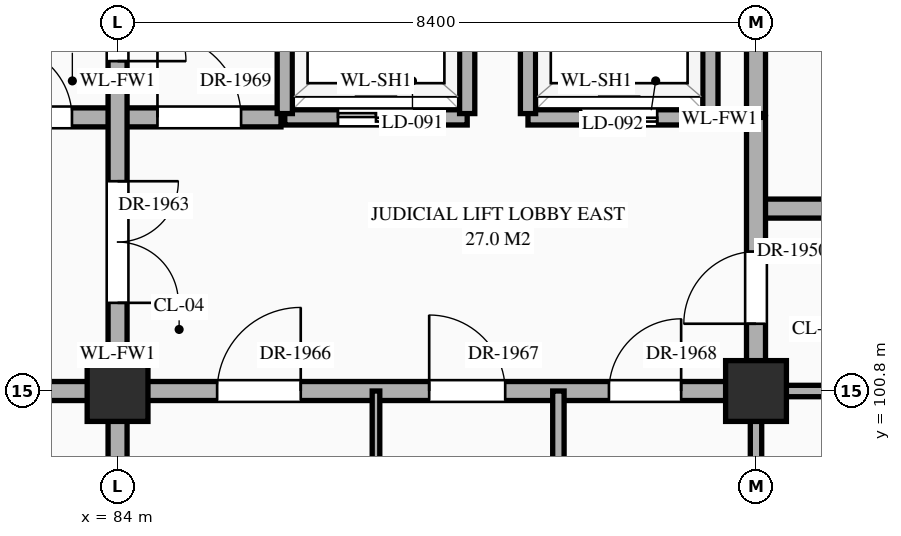
"""IFC4 building model, lengths in metres.
Left out: names, types, materials, properties, quantities, classifications, styles, units other than length and angle.
Written with IfcOpenShell. Run it as: python <this file> out.ifc"""

import sys

from ifc_helpers import new_model, si_unit, direction, frame, frame_2d, origin, origin_2d, place, context, subcontext, project, spatial, rectangle, extrude, element, fill, save


model = new_model("IFC4")
c1 = context("Model", 3, precision=1e-05, world=origin(), true_north=direction((0.0, 1.0)))
c2 = subcontext(c1, "Body", "Model", "MODEL_VIEW")
j1 = project(units=[si_unit("LENGTHUNIT", "METRE"), si_unit("PLANEANGLEUNIT", "RADIAN")], contexts=[c1])
p1 = place(None, origin())
s1 = spatial("IfcSite", under=j1, at=p1, CompositionType="ELEMENT")
p2 = place(p1, origin())
s2 = spatial("IfcBuilding", under=s1, at=p2, CompositionType="ELEMENT")
p3 = place(p2, frame((0.0, 0.0, 21.6)))
s3 = spatial("IfcBuildingStorey", under=s2, at=p3, CompositionType="ELEMENT", Elevation=21.6)
for number, where, z_axis, x_axis in (
    (1, (84.0, 100.8, 0.0), (0.0, 0.0, 1.0), (1.0, 0.0, 0.0)),
    (2, (92.4, 100.8, 0.0), (0.0, 0.0, 1.0), (1.0, 0.0, 0.0)),
):
    element("IfcColumn", number, at=place(p3, frame(where, z_axis=z_axis, x_axis=x_axis)), inside=s3, PredefinedType="COLUMN", context=c2, shape_type="SweptSolid", body=[
        extrude(rectangle(XDim=0.8, YDim=0.8, at=origin_2d()), origin(), (0.0, 0.0, 1.0), 4.5),
    ])
p4 = place(p3, frame((75.6, 100.8, 0.0), z_axis=(0.0, 0.0, 1.0), x_axis=(1.0, 0.0, 0.0)))
e3 = element("IfcWall", 3, at=p4, inside=s3, PredefinedType="STANDARD", context=c2, shape_type="SweptSolid", body=[
    extrude(rectangle(XDim=16.8, YDim=0.25, at=frame_2d((8.4, 0.0))), origin(), (0.0, 0.0, 1.0), 3.39),
])
p5 = place(p4, frame((3.7, 0.0, 0.0)))
e4 = element("IfcOpeningElement", 4, at=p5, cuts=e3, PredefinedType="OPENING", context=c2, shape_type="SweptSolid", body=[
    extrude(rectangle(XDim=1.0, YDim=2.2, at=frame_2d((0.5, 1.1))), frame((0.0, 0.137, 0.0), z_axis=(0.0, -1.0, 0.0), x_axis=(1.0, 0.0, 0.0)), (0.0, 0.0, 1.0), 0.274),
])
p6 = place(p4, frame((9.71, 0.0, 0.0)))
e5 = element("IfcOpeningElement", 5, at=p6, cuts=e3, PredefinedType="OPENING", context=c2, shape_type="SweptSolid", body=[
    extrude(rectangle(XDim=1.1, YDim=2.2, at=frame_2d((0.55, 1.1))), frame((0.0, 0.137, 0.0), z_axis=(0.0, -1.0, 0.0), x_axis=(1.0, 0.0, 0.0)), (0.0, 0.0, 1.0), 0.274),
])
p7 = place(p4, frame((12.5, 0.0, 0.0)))
e6 = element("IfcOpeningElement", 6, at=p7, cuts=e3, PredefinedType="OPENING", context=c2, shape_type="SweptSolid", body=[
    extrude(rectangle(XDim=1.0, YDim=2.2, at=frame_2d((0.5, 1.1))), frame((0.0, 0.137, 0.0), z_axis=(0.0, -1.0, 0.0), x_axis=(1.0, 0.0, 0.0)), (0.0, 0.0, 1.0), 0.274),
])
p8 = place(p4, frame((14.865, 0.0, 0.0)))
e7 = element("IfcOpeningElement", 7, at=p8, cuts=e3, PredefinedType="OPENING", context=c2, shape_type="SweptSolid", body=[
    extrude(rectangle(XDim=0.95, YDim=2.15, at=frame_2d((0.475, 1.075))), frame((0.0, 0.137, 0.0), z_axis=(0.0, -1.0, 0.0), x_axis=(1.0, 0.0, 0.0)), (0.0, 0.0, 1.0), 0.274),
])
p9 = place(p3, frame((92.4, 100.8, 0.0), z_axis=(0.0, 0.0, 1.0), x_axis=(1.0, 0.0, 0.0)))
e8 = element("IfcWall", 8, at=p9, inside=s3, PredefinedType="STANDARD", context=c2, shape_type="SweptSolid", body=[
    extrude(rectangle(XDim=4.2, YDim=0.15, at=frame_2d((2.1, 0.0))), origin(), (0.0, 0.0, 1.0), 3.39),
])
p10 = place(p9, frame((1.83, 0.0, 0.0)))
e9 = element("IfcOpeningElement", 9, at=p10, cuts=e8, PredefinedType="OPENING", context=c2, shape_type="SweptSolid", body=[
    extrude(rectangle(XDim=0.86, YDim=2.1, at=frame_2d((0.43, 1.05))), frame((0.0, 0.087, 0.0), z_axis=(0.0, -1.0, 0.0), x_axis=(1.0, 0.0, 0.0)), (0.0, 0.0, 1.0), 0.174),
])
p11 = place(p3, frame((92.4, 103.2, 0.0), z_axis=(0.0, 0.0, 1.0), x_axis=(1.0, 0.0, 0.0)))
e10 = element("IfcWall", 10, at=p11, inside=s3, PredefinedType="STANDARD", context=c2, shape_type="SweptSolid", body=[
    extrude(rectangle(XDim=4.2, YDim=0.25, at=frame_2d((2.1, 0.0))), origin(), (0.0, 0.0, 1.0), 4.24),
])
p12 = place(p11, frame((1.55, 0.0, 0.0)))
e11 = element("IfcOpeningElement", 11, at=p12, cuts=e10, PredefinedType="OPENING", context=c2, shape_type="SweptSolid", body=[
    extrude(rectangle(XDim=1.1, YDim=2.2, at=frame_2d((0.55, 1.1))), frame((0.0, 0.137, 0.0), z_axis=(0.0, -1.0, 0.0), x_axis=(1.0, 0.0, 0.0)), (0.0, 0.0, 1.0), 0.274),
])
p13 = place(p3, frame((81.85, 104.4, 0.0), z_axis=(0.0, 0.0, 1.0), x_axis=(1.0, 0.0, 0.0)))
e12 = element("IfcWall", 12, at=p13, inside=s3, PredefinedType="STANDARD", context=c2, shape_type="SweptSolid", body=[
    extrude(rectangle(XDim=4.3, YDim=0.25, at=frame_2d((2.15, 0.0))), origin(), (0.0, 0.0, 1.0), 4.24),
])
p14 = place(p13, frame((0.6, 0.0, 0.0)))
e13 = element("IfcOpeningElement", 13, at=p14, cuts=e12, PredefinedType="OPENING", context=c2, shape_type="SweptSolid", body=[
    extrude(rectangle(XDim=0.95, YDim=2.15, at=frame_2d((0.475, 1.075))), frame((0.0, 0.137, 0.0), z_axis=(0.0, -1.0, 0.0), x_axis=(1.0, 0.0, 0.0)), (0.0, 0.0, 1.0), 0.274),
])
p15 = place(p13, frame((2.675, 0.0, 0.0)))
e14 = element("IfcOpeningElement", 14, at=p15, cuts=e12, PredefinedType="OPENING", context=c2, shape_type="SweptSolid", body=[
    extrude(rectangle(XDim=1.1, YDim=2.2, at=frame_2d((0.55, 1.1))), frame((0.0, 0.137, 0.0), z_axis=(0.0, -1.0, 0.0), x_axis=(1.0, 0.0, 0.0)), (0.0, 0.0, 1.0), 0.274),
])
p16 = place(p3, frame((86.2, 104.4, 0.0), z_axis=(0.0, 0.0, 1.0), x_axis=(1.0, 0.0, 0.0)))
e15 = element("IfcWall", 15, at=p16, inside=s3, PredefinedType="STANDARD", context=c2, shape_type="SweptSolid", body=[
    extrude(rectangle(XDim=2.4, YDim=0.2, at=frame_2d((1.2, 0.0))), origin(), (0.0, 0.0, 1.0), 4.24),
])
p17 = place(p16, frame((0.7, 0.0, 0.0)))
e16 = element("IfcOpeningElement", 16, at=p17, cuts=e15, PredefinedType="OPENING", context=c2, shape_type="SweptSolid", body=[
    extrude(rectangle(XDim=1.0, YDim=2.15, at=frame_2d((0.5, 1.075))), frame((0.0, 0.112, 0.0), z_axis=(0.0, -1.0, 0.0), x_axis=(1.0, 0.0, 0.0)), (0.0, 0.0, 1.0), 0.224),
])
p18 = place(p3, frame((89.4, 104.4, 0.0), z_axis=(0.0, 0.0, 1.0), x_axis=(1.0, 0.0, 0.0)))
e17 = element("IfcWall", 17, at=p18, inside=s3, PredefinedType="STANDARD", context=c2, shape_type="SweptSolid", body=[
    extrude(rectangle(XDim=2.4, YDim=0.2, at=frame_2d((1.2, 0.0))), origin(), (0.0, 0.0, 1.0), 4.24),
])
p19 = place(p18, frame((0.7, 0.0, 0.0)))
e18 = element("IfcOpeningElement", 18, at=p19, cuts=e17, PredefinedType="OPENING", context=c2, shape_type="SweptSolid", body=[
    extrude(rectangle(XDim=1.0, YDim=2.15, at=frame_2d((0.5, 1.075))), frame((0.0, 0.112, 0.0), z_axis=(0.0, -1.0, 0.0), x_axis=(1.0, 0.0, 0.0)), (0.0, 0.0, 1.0), 0.224),
])
p20 = place(p3, frame((84.0, 79.24, 0.0), z_axis=(0.0, 0.0, 1.0), x_axis=(0.0, 1.0, 0.0)))
e19 = element("IfcWall", 19, at=p20, inside=s3, PredefinedType="STANDARD", context=c2, shape_type="SweptSolid", body=[
    extrude(rectangle(XDim=35.92, YDim=0.25, at=frame_2d((17.96, 0.0))), origin(), (0.0, 0.0, 1.0), 3.49),
])
p21 = place(p20, frame((22.72, 0.0, 0.0)))
e20 = element("IfcOpeningElement", 20, at=p21, cuts=e19, PredefinedType="OPENING", context=c2, shape_type="SweptSolid", body=[
    extrude(rectangle(XDim=1.6, YDim=2.3, at=frame_2d((0.8, 1.15))), frame((0.0, 0.137, 0.0), z_axis=(0.0, -1.0, 0.0), x_axis=(1.0, 0.0, 0.0)), (0.0, 0.0, 1.0), 0.274),
])
p22 = place(p20, frame((12.45, 0.0, 0.0)))
e21 = element("IfcOpeningElement", 21, at=p22, cuts=e19, PredefinedType="OPENING", context=c2, shape_type="SweptSolid", body=[
    extrude(rectangle(XDim=1.1, YDim=2.2, at=frame_2d((0.55, 1.1))), frame((0.0, 0.137, 0.0), z_axis=(0.0, -1.0, 0.0), x_axis=(1.0, 0.0, 0.0)), (0.0, 0.0, 1.0), 0.274),
])
p23 = place(p20, frame((15.245, 0.0, 0.0)))
e22 = element("IfcOpeningElement", 22, at=p23, cuts=e19, PredefinedType="OPENING", context=c2, shape_type="SweptSolid", body=[
    extrude(rectangle(XDim=0.95, YDim=2.15, at=frame_2d((0.475, 1.075))), frame((0.0, 0.137, 0.0), z_axis=(0.0, -1.0, 0.0), x_axis=(1.0, 0.0, 0.0)), (0.0, 0.0, 1.0), 0.274),
])
p24 = place(p20, frame((25.9, 0.0, 0.0)))
e23 = element("IfcOpeningElement", 23, at=p24, cuts=e19, PredefinedType="OPENING", context=c2, shape_type="SweptSolid", body=[
    extrude(rectangle(XDim=1.8, YDim=2.35, at=frame_2d((0.9, 1.175))), frame((0.0, 0.137, 0.0), z_axis=(0.0, -1.0, 0.0), x_axis=(1.0, 0.0, 0.0)), (0.0, 0.0, 1.0), 0.274),
])
p25 = place(p20, frame((29.62, 0.0, 0.0)))
e24 = element("IfcOpeningElement", 24, at=p25, cuts=e19, PredefinedType="OPENING", context=c2, shape_type="SweptSolid", body=[
    extrude(rectangle(XDim=1.0, YDim=2.2, at=frame_2d((0.5, 1.1))), frame((0.0, 0.137, 0.0), z_axis=(0.0, -1.0, 0.0), x_axis=(1.0, 0.0, 0.0)), (0.0, 0.0, 1.0), 0.274),
])
p26 = place(p20, frame((5.3, 0.0, 0.0)))
e25 = element("IfcOpeningElement", 25, at=p26, cuts=e19, PredefinedType="OPENING", context=c2, shape_type="SweptSolid", body=[
    extrude(rectangle(XDim=1.0, YDim=2.2, at=frame_2d((0.5, 1.1))), frame((0.0, 0.137, 0.0), z_axis=(0.0, -1.0, 0.0), x_axis=(1.0, 0.0, 0.0)), (0.0, 0.0, 1.0), 0.274),
])
p27 = place(p3, frame((86.2, 104.45, 0.0), z_axis=(0.0, 0.0, 1.0), x_axis=(0.0, 1.0, 0.0)))
e26 = element("IfcWall", 26, at=p27, inside=s3, PredefinedType="STANDARD", context=c2, shape_type="SweptSolid", body=[
    extrude(rectangle(XDim=2.3, YDim=0.2, at=frame_2d((1.15, 0.0))), origin(), (0.0, 0.0, 1.0), 4.24),
])
p28 = place(p3, frame((87.4, 96.0, 0.0), z_axis=(0.0, 0.0, 1.0), x_axis=(0.0, 1.0, 0.0)))
e27 = element("IfcWall", 27, at=p28, inside=s3, PredefinedType="STANDARD", context=c2, shape_type="SweptSolid", body=[
    extrude(rectangle(XDim=4.8, YDim=0.1, at=frame_2d((2.4, 0.0))), origin(), (0.0, 0.0, 1.0), 4.24),
])
p29 = place(p28, frame((1.83, 0.0, 0.0)))
e28 = element("IfcOpeningElement", 28, at=p29, cuts=e27, PredefinedType="OPENING", context=c2, shape_type="SweptSolid", body=[
    extrude(rectangle(XDim=1.14, YDim=2.4, at=frame_2d((0.57, 1.2))), frame((0.0, 0.062, 0.0), z_axis=(0.0, -1.0, 0.0), x_axis=(1.0, 0.0, 0.0)), (0.0, 0.0, 1.0), 0.124),
])
for number, where, z_axis, x_axis in (
    (29, (88.6, 104.45, 0.0), (0.0, 0.0, 1.0), (0.0, 1.0, 0.0)),
    (30, (89.4, 104.45, 0.0), (0.0, 0.0, 1.0), (0.0, 1.0, 0.0)),
):
    element("IfcWall", number, at=place(p3, frame(where, z_axis=z_axis, x_axis=x_axis)), inside=s3, PredefinedType="STANDARD", context=c2, shape_type="SweptSolid", body=[
        extrude(rectangle(XDim=2.3, YDim=0.2, at=frame_2d((1.15, 0.0))), origin(), (0.0, 0.0, 1.0), 4.24),
    ])
p30 = place(p3, frame((89.8, 96.0, 0.0), z_axis=(0.0, 0.0, 1.0), x_axis=(0.0, 1.0, 0.0)))
e31 = element("IfcWall", 31, at=p30, inside=s3, PredefinedType="STANDARD", context=c2, shape_type="SweptSolid", body=[
    extrude(rectangle(XDim=4.8, YDim=0.15, at=frame_2d((2.4, 0.0))), origin(), (0.0, 0.0, 1.0), 4.24),
])
p31 = place(p30, frame((1.95, 0.0, 0.0)))
e32 = element("IfcOpeningElement", 32, at=p31, cuts=e31, PredefinedType="OPENING", context=c2, shape_type="SweptSolid", body=[
    extrude(rectangle(XDim=0.9, YDim=2.15, at=frame_2d((0.45, 1.075))), frame((0.0, 0.087, 0.0), z_axis=(0.0, -1.0, 0.0), x_axis=(1.0, 0.0, 0.0)), (0.0, 0.0, 1.0), 0.174),
])
p32 = place(p3, frame((91.8, 104.45, 0.0), z_axis=(0.0, 0.0, 1.0), x_axis=(0.0, 1.0, 0.0)))
e33 = element("IfcWall", 33, at=p32, inside=s3, PredefinedType="STANDARD", context=c2, shape_type="SweptSolid", body=[
    extrude(rectangle(XDim=2.3, YDim=0.2, at=frame_2d((1.15, 0.0))), origin(), (0.0, 0.0, 1.0), 4.24),
])
p33 = place(p3, frame((92.4, 96.0, 0.0), z_axis=(0.0, 0.0, 1.0), x_axis=(0.0, 1.0, 0.0)))
e34 = element("IfcWall", 34, at=p33, inside=s3, PredefinedType="STANDARD", context=c2, shape_type="SweptSolid", body=[
    extrude(rectangle(XDim=4.8, YDim=0.15, at=frame_2d((2.4, 0.0))), origin(), (0.0, 0.0, 1.0), 3.49),
])
p34 = place(p3, frame((92.4, 100.8, 0.0), z_axis=(0.0, 0.0, 1.0), x_axis=(0.0, 1.0, 0.0)))
e35 = element("IfcWall", 35, at=p34, inside=s3, PredefinedType="STANDARD", context=c2, shape_type="SweptSolid", body=[
    extrude(rectangle(XDim=3.6, YDim=0.25, at=frame_2d((1.8, 0.0))), origin(), (0.0, 0.0, 1.0), 3.49),
])
p35 = place(p34, frame((0.885, 0.0, 0.0)))
e36 = element("IfcOpeningElement", 36, at=p35, cuts=e35, PredefinedType="OPENING", context=c2, shape_type="SweptSolid", body=[
    extrude(rectangle(XDim=0.95, YDim=2.15, at=frame_2d((0.475, 1.075))), frame((0.0, 0.137, 0.0), z_axis=(0.0, -1.0, 0.0), x_axis=(1.0, 0.0, 0.0)), (0.0, 0.0, 1.0), 0.274),
])
p36 = place(p3, frame((92.4, 104.45, 0.0), z_axis=(0.0, 0.0, 1.0), x_axis=(0.0, 1.0, 0.0)))
e37 = element("IfcWall", 37, at=p36, inside=s3, PredefinedType="STANDARD", context=c2, shape_type="SweptSolid", body=[
    extrude(rectangle(XDim=3.5, YDim=0.25, at=frame_2d((1.75, 0.0))), origin(), (0.0, 0.0, 1.0), 3.49),
])
p37 = place(p17, origin())
e38 = element("IfcDoor", 38, at=p37, inside=s3, OperationType="DOUBLE_DOOR_SLIDING", PredefinedType="DOOR", context=c2, shape_type="SweptSolid", body=[
    extrude(rectangle(XDim=1.0, YDim=2.15, at=frame_2d((0.5, 1.075))), frame((0.0, 0.025, 0.0), z_axis=(0.0, -1.0, 0.0), x_axis=(1.0, 0.0, 0.0)), (0.0, 0.0, 1.0), 0.05),
])
fill(e16, e38)
p38 = place(p19, origin())
e39 = element("IfcDoor", 39, at=p38, inside=s3, OperationType="DOUBLE_DOOR_SLIDING", PredefinedType="DOOR", context=c2, shape_type="SweptSolid", body=[
    extrude(rectangle(XDim=1.0, YDim=2.15, at=frame_2d((0.5, 1.075))), frame((0.0, 0.025, 0.0), z_axis=(0.0, -1.0, 0.0), x_axis=(1.0, 0.0, 0.0)), (0.0, 0.0, 1.0), 0.05),
])
fill(e18, e39)
p39 = place(p35, origin())
e40 = element("IfcDoor", 40, at=p39, inside=s3, OperationType="SINGLE_SWING_LEFT", PredefinedType="DOOR", context=c2, shape_type="SweptSolid", body=[
    extrude(rectangle(XDim=0.95, YDim=2.15, at=frame_2d((0.475, 1.075))), frame((0.0, 0.025, 0.0), z_axis=(0.0, -1.0, 0.0), x_axis=(1.0, 0.0, 0.0)), (0.0, 0.0, 1.0), 0.05),
])
fill(e36, e40)
p40 = place(p21, frame((1.6, 0.0, 0.0), z_axis=(0.0, 0.0, 1.0), x_axis=(-1.0, 0.0, 0.0)))
e41 = element("IfcDoor", 41, at=p40, inside=s3, OperationType="DOUBLE_DOOR_SINGLE_SWING", PredefinedType="DOOR", context=c2, shape_type="SweptSolid", body=[
    extrude(rectangle(XDim=1.6, YDim=2.3, at=frame_2d((0.8, 1.15))), frame((0.0, 0.025, 0.0), z_axis=(0.0, -1.0, 0.0), x_axis=(1.0, 0.0, 0.0)), (0.0, 0.0, 1.0), 0.05),
])
fill(e20, e41)
p41 = place(p14, origin())
e42 = element("IfcDoor", 42, at=p41, inside=s3, OperationType="SINGLE_SWING_LEFT", PredefinedType="DOOR", context=c2, shape_type="SweptSolid", body=[
    extrude(rectangle(XDim=0.95, YDim=2.15, at=frame_2d((0.475, 1.075))), frame((0.0, 0.025, 0.0), z_axis=(0.0, -1.0, 0.0), x_axis=(1.0, 0.0, 0.0)), (0.0, 0.0, 1.0), 0.05),
])
fill(e13, e42)
p42 = place(p6, origin())
e43 = element("IfcDoor", 43, at=p42, inside=s3, OperationType="SINGLE_SWING_RIGHT", PredefinedType="DOOR", context=c2, shape_type="SweptSolid", body=[
    extrude(rectangle(XDim=1.1, YDim=2.2, at=frame_2d((0.55, 1.1))), frame((0.0, 0.025, 0.0), z_axis=(0.0, -1.0, 0.0), x_axis=(1.0, 0.0, 0.0)), (0.0, 0.0, 1.0), 0.05),
])
fill(e5, e43)
p43 = place(p7, origin())
e44 = element("IfcDoor", 44, at=p43, inside=s3, OperationType="SINGLE_SWING_LEFT", PredefinedType="DOOR", context=c2, shape_type="SweptSolid", body=[
    extrude(rectangle(XDim=1.0, YDim=2.2, at=frame_2d((0.5, 1.1))), frame((0.0, 0.025, 0.0), z_axis=(0.0, -1.0, 0.0), x_axis=(1.0, 0.0, 0.0)), (0.0, 0.0, 1.0), 0.05),
])
fill(e6, e44)
p44 = place(p8, origin())
e45 = element("IfcDoor", 45, at=p44, inside=s3, OperationType="SINGLE_SWING_RIGHT", PredefinedType="DOOR", context=c2, shape_type="SweptSolid", body=[
    extrude(rectangle(XDim=0.95, YDim=2.15, at=frame_2d((0.475, 1.075))), frame((0.0, 0.025, 0.0), z_axis=(0.0, -1.0, 0.0), x_axis=(1.0, 0.0, 0.0)), (0.0, 0.0, 1.0), 0.05),
])
fill(e7, e45)
p45 = place(p15, origin())
e46 = element("IfcDoor", 46, at=p45, inside=s3, OperationType="SINGLE_SWING_LEFT", PredefinedType="DOOR", context=c2, shape_type="SweptSolid", body=[
    extrude(rectangle(XDim=1.1, YDim=2.2, at=frame_2d((0.55, 1.1))), frame((0.0, 0.025, 0.0), z_axis=(0.0, -1.0, 0.0), x_axis=(1.0, 0.0, 0.0)), (0.0, 0.0, 1.0), 0.05),
])
fill(e14, e46)
p46 = place(p24, frame((1.8, 0.0, 0.0), z_axis=(0.0, 0.0, 1.0), x_axis=(-1.0, 0.0, 0.0)))
e47 = element("IfcDoor", 47, at=p46, inside=s3, OperationType="DOUBLE_DOOR_SINGLE_SWING", PredefinedType="DOOR", context=c2, shape_type="SweptSolid", body=[
    extrude(rectangle(XDim=1.8, YDim=2.35, at=frame_2d((0.9, 1.175))), frame((0.0, 0.025, 0.0), z_axis=(0.0, -1.0, 0.0), x_axis=(1.0, 0.0, 0.0)), (0.0, 0.0, 1.0), 0.05),
])
fill(e23, e47)
save(model, sys.argv[1])
